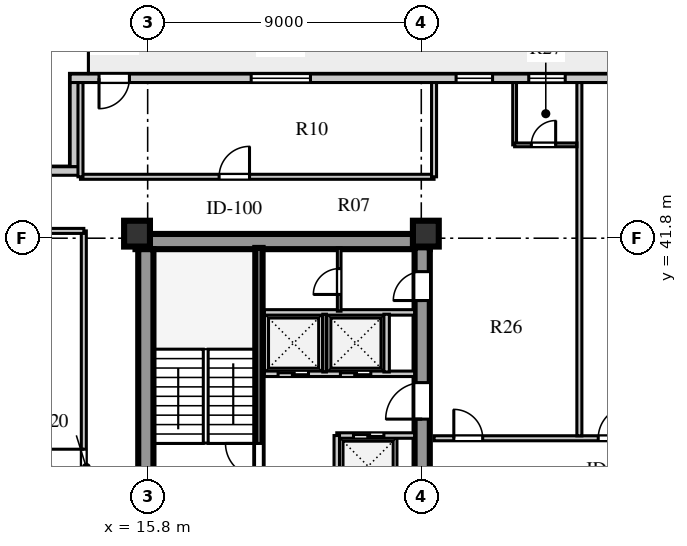
"""IFC4 building model, lengths in metres.
Left out: names, types, materials, properties, quantities, classifications, styles, units other than length and angle.
Written with IfcOpenShell. Run it as: python <this file> out.ifc"""

import sys

from ifc_helpers import new_model, si_unit, direction, frame, frame_2d, origin, origin_2d, place, context, subcontext, project, spatial, rectangle, extrude, element, fill, save


model = new_model("IFC4")
c1 = context("Model", 3, precision=1e-05, world=origin(), true_north=direction((0.0, 1.0)))
c2 = subcontext(c1, "Body", "Model", "MODEL_VIEW")
j1 = project(units=[si_unit("LENGTHUNIT", "METRE"), si_unit("PLANEANGLEUNIT", "RADIAN")], contexts=[c1])
p1 = place(None, origin())
s1 = spatial("IfcSite", under=j1, at=p1, CompositionType="ELEMENT")
p2 = place(p1, origin())
s2 = spatial("IfcBuilding", under=s1, at=p2, CompositionType="ELEMENT")
p3 = place(p2, frame((0.0, 0.0, 142.5)))
s3 = spatial("IfcBuildingStorey", under=s2, at=p3, CompositionType="ELEMENT", Elevation=142.5)
p4 = place(p3, frame((15.4, 41.69, 0.0), z_axis=(0.0, 0.0, 1.0), x_axis=(1.0, 0.0, 0.0)))
e1 = element("IfcWall", 1, at=p4, inside=s3, PredefinedType="SHEAR", context=c2, shape_type="SweptSolid", body=[
    extrude(rectangle(XDim=9.68, YDim=0.5, at=frame_2d((4.84, 0.0))), origin(), (0.0, 0.0, 1.0), 3.6),
])
p5 = place(p3, frame((15.74, 15.81, 0.0), z_axis=(0.0, 0.0, 1.0), x_axis=(0.0, 1.0, 0.0)))
e2 = element("IfcWall", 2, at=p5, inside=s3, PredefinedType="SHEAR", context=c2, shape_type="SweptSolid", body=[
    extrude(rectangle(XDim=25.63, YDim=0.5, at=frame_2d((12.815, 0.0))), origin(), (0.0, 0.0, 1.0), 3.6),
])
p6 = place(p3, frame((24.83, 15.74, 0.0), z_axis=(0.0, 0.0, 1.0), x_axis=(0.0, 1.0, 0.0)))
e3 = element("IfcWall", 3, at=p6, inside=s3, PredefinedType="SHEAR", context=c2, shape_type="SweptSolid", body=[
    extrude(rectangle(XDim=25.76, YDim=0.5, at=frame_2d((12.88, 0.0))), origin(), (0.0, 0.0, 1.0), 3.6),
])
p7 = place(p6, frame((1.61, 0.0, 0.0)))
e4 = element("IfcOpeningElement", 4, at=p7, cuts=e3, PredefinedType="OPENING", context=c2, shape_type="SweptSolid", body=[
    extrude(rectangle(XDim=1.2, YDim=2.1, at=frame_2d((0.6, 1.05))), frame((0.0, 0.26, 0.0), z_axis=(0.0, -1.0, 0.0), x_axis=(1.0, 0.0, 0.0)), (0.0, 0.0, 1.0), 0.52),
])
p8 = place(p6, frame((6.78, 0.0, 0.0)))
e5 = element("IfcOpeningElement", 5, at=p8, cuts=e3, PredefinedType="OPENING", context=c2, shape_type="SweptSolid", body=[
    extrude(rectangle(XDim=0.85, YDim=2.06, at=frame_2d((0.425, 1.03))), frame((0.0, 0.26, 0.0), z_axis=(0.0, -1.0, 0.0), x_axis=(1.0, 0.0, 0.0)), (0.0, 0.0, 1.0), 0.52),
])
p9 = place(p6, frame((12.11, 0.0, 0.0)))
e6 = element("IfcOpeningElement", 6, at=p9, cuts=e3, PredefinedType="OPENING", context=c2, shape_type="SweptSolid", body=[
    extrude(rectangle(XDim=1.5, YDim=2.12, at=frame_2d((0.75, 1.06))), frame((0.0, 0.26, 0.0), z_axis=(0.0, -1.0, 0.0), x_axis=(1.0, 0.0, 0.0)), (0.0, 0.0, 1.0), 0.52),
])
p10 = place(p6, frame((20.11, 0.0, 0.0)))
e7 = element("IfcOpeningElement", 7, at=p10, cuts=e3, PredefinedType="OPENING", context=c2, shape_type="SweptSolid", body=[
    extrude(rectangle(XDim=1.2, YDim=2.12, at=frame_2d((0.6, 1.06))), frame((0.0, 0.26, 0.0), z_axis=(0.0, -1.0, 0.0), x_axis=(1.0, 0.0, 0.0)), (0.0, 0.0, 1.0), 0.52),
])
p11 = place(p6, frame((24.01, 0.0, 0.0)))
e8 = element("IfcOpeningElement", 8, at=p11, cuts=e3, PredefinedType="OPENING", context=c2, shape_type="SweptSolid", body=[
    extrude(rectangle(XDim=0.95, YDim=2.1, at=frame_2d((0.475, 1.05))), frame((0.0, 0.26, 0.0), z_axis=(0.0, -1.0, 0.0), x_axis=(1.0, 0.0, 0.0)), (0.0, 0.0, 1.0), 0.52),
])
for number, where, z_axis, x_axis in (
    (9, (15.45, 41.95, 0.0), (0.0, 0.0, 1.0), (1.0, 0.0, 0.0)),
    (10, (24.95, 41.95, 0.0), (0.0, 0.0, 1.0), (1.0, 0.0, 0.0)),
):
    element("IfcColumn", number, at=place(p3, frame(where, z_axis=z_axis, x_axis=x_axis)), inside=s3, PredefinedType="COLUMN", context=c2, shape_type="SweptSolid", body=[
        extrude(rectangle(XDim=0.85, YDim=0.85, at=origin_2d()), origin(), (0.0, 0.0, 1.0), 3.6),
    ])
p12 = place(p3, frame((45.35, 47.06, 0.0), z_axis=(0.0, 0.0, 1.0), x_axis=(-1.0, 0.0, 0.0)))
e11 = element("IfcWall", 11, at=p12, inside=s3, PredefinedType="STANDARD", context=c2, shape_type="SweptSolid", body=[
    extrude(rectangle(XDim=32.1, YDim=0.28, at=frame_2d((16.05, 0.0))), origin(), (0.0, 0.0, 1.0), 3.6),
])
p13 = place(p12, frame((30.15, 0.0, 0.0)))
e12 = element("IfcOpeningElement", 12, at=p13, cuts=e11, PredefinedType="OPENING", context=c2, shape_type="SweptSolid", body=[
    extrude(rectangle(XDim=1.0, YDim=2.05, at=frame_2d((0.5, 1.025))), frame((0.0, 0.15, 0.0), z_axis=(0.0, -1.0, 0.0), x_axis=(1.0, 0.0, 0.0)), (0.0, 0.0, 1.0), 0.3),
])
p14 = place(p12, frame((24.195, 0.0, 0.8)))
e13 = element("IfcOpeningElement", 13, at=p14, cuts=e11, PredefinedType="OPENING", context=c2, shape_type="SweptSolid", body=[
    extrude(rectangle(XDim=1.95, YDim=2.0, at=frame_2d((0.975, 1.0))), frame((0.0, 0.15, 0.0), z_axis=(0.0, -1.0, 0.0), x_axis=(1.0, 0.0, 0.0)), (0.0, 0.0, 1.0), 0.3),
])
p15 = place(p12, frame((18.205, 0.0, 0.8)))
e14 = element("IfcOpeningElement", 14, at=p15, cuts=e11, PredefinedType="OPENING", context=c2, shape_type="SweptSolid", body=[
    extrude(rectangle(XDim=1.2, YDim=1.75, at=frame_2d((0.6, 0.875))), frame((0.0, 0.15, 0.0), z_axis=(0.0, -1.0, 0.0), x_axis=(1.0, 0.0, 0.0)), (0.0, 0.0, 1.0), 0.3),
])
p16 = place(p12, frame((15.815, 0.0, 0.8)))
e15 = element("IfcOpeningElement", 15, at=p16, cuts=e11, PredefinedType="OPENING", context=c2, shape_type="SweptSolid", body=[
    extrude(rectangle(XDim=1.2, YDim=1.75, at=frame_2d((0.6, 0.875))), frame((0.0, 0.15, 0.0), z_axis=(0.0, -1.0, 0.0), x_axis=(1.0, 0.0, 0.0)), (0.0, 0.0, 1.0), 0.3),
])
p17 = place(p12, frame((12.24, 0.0, 0.8)))
e16 = element("IfcOpeningElement", 16, at=p17, cuts=e11, PredefinedType="OPENING", context=c2, shape_type="SweptSolid", body=[
    extrude(rectangle(XDim=1.5, YDim=2.0, at=frame_2d((0.75, 1.0))), frame((0.0, 0.15, 0.0), z_axis=(0.0, -1.0, 0.0), x_axis=(1.0, 0.0, 0.0)), (0.0, 0.0, 1.0), 0.3),
])
p18 = place(p12, frame((6.98, 0.0, 0.8)))
e17 = element("IfcOpeningElement", 17, at=p18, cuts=e11, PredefinedType="OPENING", context=c2, shape_type="SweptSolid", body=[
    extrude(rectangle(XDim=1.2, YDim=1.75, at=frame_2d((0.6, 0.875))), frame((0.0, 0.15, 0.0), z_axis=(0.0, -1.0, 0.0), x_axis=(1.0, 0.0, 0.0)), (0.0, 0.0, 1.0), 0.3),
])
p19 = place(p12, frame((1.12, 0.0, 0.8)))
e18 = element("IfcOpeningElement", 18, at=p19, cuts=e11, PredefinedType="OPENING", context=c2, shape_type="SweptSolid", body=[
    extrude(rectangle(XDim=2.4, YDim=2.05, at=frame_2d((1.2, 1.025))), frame((0.0, 0.15, 0.0), z_axis=(0.0, -1.0, 0.0), x_axis=(1.0, 0.0, 0.0)), (0.0, 0.0, 1.0), 0.3),
])
p20 = place(p3, frame((13.39, 46.92, 0.0), z_axis=(0.0, 0.0, 1.0), x_axis=(0.0, -1.0, 0.0)))
e19 = element("IfcWall", 19, at=p20, inside=s3, PredefinedType="STANDARD", context=c2, shape_type="SweptSolid", body=[
    extrude(rectangle(XDim=2.77, YDim=0.28, at=frame_2d((1.385, 0.0))), origin(), (0.0, 0.0, 1.0), 3.6),
])
p21 = place(p3, frame((13.53, 44.01, 0.0), z_axis=(0.0, 0.0, 1.0), x_axis=(-1.0, 0.0, 0.0)))
e20 = element("IfcWall", 20, at=p21, inside=s3, PredefinedType="STANDARD", context=c2, shape_type="SweptSolid", body=[
    extrude(rectangle(XDim=3.33, YDim=0.28, at=frame_2d((1.665, 0.0))), origin(), (0.0, 0.0, 1.0), 3.6),
])
p22 = place(p3, frame((19.46, 33.3, 0.0), z_axis=(0.0, 0.0, 1.0), x_axis=(0.0, 1.0, 0.0)))
e21 = element("IfcWall", 21, at=p22, inside=s3, PredefinedType="SHEAR", context=c2, shape_type="SweptSolid", body=[
    extrude(rectangle(XDim=8.18, YDim=0.24, at=frame_2d((4.09, 0.0))), origin(), (0.0, 0.0, 1.0), 3.85),
])
p23 = place(p22, frame((0.65, 0.0, 0.0)))
e22 = element("IfcOpeningElement", 22, at=p23, cuts=e21, PredefinedType="OPENING", context=c2, shape_type="SweptSolid", body=[
    extrude(rectangle(XDim=1.1, YDim=2.1, at=frame_2d((0.55, 1.05))), frame((0.0, 0.13, 0.0), z_axis=(0.0, -1.0, 0.0), x_axis=(1.0, 0.0, 0.0)), (0.0, 0.0, 1.0), 0.26),
])
p24 = place(p3, frame((22.02, 35.31, 0.0), z_axis=(0.0, 0.0, 1.0), x_axis=(1.0, 0.0, 0.0)))
e23 = element("IfcWall", 23, at=p24, inside=s3, PredefinedType="SOLIDWALL", context=c2, shape_type="SweptSolid", body=[
    extrude(rectangle(XDim=2.56, YDim=0.18, at=frame_2d((1.28, 0.0))), origin(), (0.0, 0.0, 1.0), 3.6),
])
p25 = place(p24, frame((0.55, 0.0, 0.0)))
e24 = element("IfcOpeningElement", 24, at=p25, cuts=e23, PredefinedType="OPENING", context=c2, shape_type="SweptSolid", body=[
    extrude(rectangle(XDim=1.0, YDim=2.1, at=frame_2d((0.5, 1.05))), frame((0.0, 0.1, 0.0), z_axis=(0.0, -1.0, 0.0), x_axis=(1.0, 0.0, 0.0)), (0.0, 0.0, 1.0), 0.2),
])
p26 = place(p3, frame((22.02, 33.3, 0.0), z_axis=(0.0, 0.0, 1.0), x_axis=(0.0, 1.0, 0.0)))
e25 = element("IfcWall", 25, at=p26, inside=s3, PredefinedType="SOLIDWALL", context=c2, shape_type="SweptSolid", body=[
    extrude(rectangle(XDim=2.01, YDim=0.18, at=frame_2d((1.005, 0.0))), origin(), (0.0, 0.0, 1.0), 3.6),
])
p27 = place(p3, frame((19.64, 37.34, 0.0), z_axis=(0.0, 0.0, 1.0), x_axis=(1.0, 0.0, 0.0)))
e26 = element("IfcWall", 26, at=p27, inside=s3, PredefinedType="SOLIDWALL", context=c2, shape_type="SweptSolid", body=[
    extrude(rectangle(XDim=4.94, YDim=0.18, at=frame_2d((2.47, 0.0))), origin(), (0.0, 0.0, 1.0), 3.6),
])
p28 = place(p27, frame((0.45, 0.0, 0.0)))
e27 = element("IfcOpeningElement", 27, at=p28, cuts=e26, PredefinedType="OPENING", context=c2, shape_type="SweptSolid", body=[
    extrude(rectangle(XDim=1.0, YDim=2.1, at=frame_2d((0.5, 1.05))), frame((0.0, 0.1, 0.0), z_axis=(0.0, -1.0, 0.0), x_axis=(1.0, 0.0, 0.0)), (0.0, 0.0, 1.0), 0.2),
])
p29 = place(p27, frame((2.5, 0.0, 0.0)))
e28 = element("IfcOpeningElement", 28, at=p29, cuts=e26, PredefinedType="OPENING", context=c2, shape_type="SweptSolid", body=[
    extrude(rectangle(XDim=1.0, YDim=2.1, at=frame_2d((0.5, 1.05))), frame((0.0, 0.1, 0.0), z_axis=(0.0, -1.0, 0.0), x_axis=(1.0, 0.0, 0.0)), (0.0, 0.0, 1.0), 0.2),
])
p30 = place(p3, frame((19.64, 39.36, 0.0), z_axis=(0.0, 0.0, 1.0), x_axis=(1.0, 0.0, 0.0)))
e29 = element("IfcWall", 29, at=p30, inside=s3, PredefinedType="SOLIDWALL", context=c2, shape_type="SweptSolid", body=[
    extrude(rectangle(XDim=4.94, YDim=0.18, at=frame_2d((2.47, 0.0))), origin(), (0.0, 0.0, 1.0), 3.6),
])
p31 = place(p3, frame((21.62, 37.4, 0.0), z_axis=(0.0, 0.0, 1.0), x_axis=(0.0, 1.0, 0.0)))
e30 = element("IfcWall", 30, at=p31, inside=s3, PredefinedType="PARTITIONING", context=c2, shape_type="SweptSolid", body=[
    extrude(rectangle(XDim=1.9, YDim=0.12, at=frame_2d((0.95, 0.0))), origin(), (0.0, 0.0, 1.0), 3.6),
])
p32 = place(p3, frame((23.66, 37.4, 0.0), z_axis=(0.0, 0.0, 1.0), x_axis=(0.0, 1.0, 0.0)))
e31 = element("IfcWall", 31, at=p32, inside=s3, PredefinedType="SOLIDWALL", context=c2, shape_type="SweptSolid", body=[
    extrude(rectangle(XDim=1.9, YDim=0.18, at=frame_2d((0.95, 0.0))), origin(), (0.0, 0.0, 1.0), 3.6),
])
p33 = place(p3, frame((22.1, 39.4, 0.0), z_axis=(0.0, 0.0, 1.0), x_axis=(0.0, 1.0, 0.0)))
e32 = element("IfcWall", 32, at=p33, inside=s3, PredefinedType="PARTITIONING", context=c2, shape_type="SweptSolid", body=[
    extrude(rectangle(XDim=2.08, YDim=0.12, at=frame_2d((1.04, 0.0))), origin(), (0.0, 0.0, 1.0), 3.6),
])
p34 = place(p33, frame((0.55, 0.0, 0.0)))
e33 = element("IfcOpeningElement", 33, at=p34, cuts=e32, PredefinedType="OPENING", context=c2, shape_type="SweptSolid", body=[
    extrude(rectangle(XDim=0.85, YDim=2.06, at=frame_2d((0.425, 1.03))), frame((0.0, 0.07, 0.0), z_axis=(0.0, -1.0, 0.0), x_axis=(1.0, 0.0, 0.0)), (0.0, 0.0, 1.0), 0.14),
])
p35 = place(p3, frame((25.22, 35.22, 0.0), z_axis=(0.0, 0.0, 1.0), x_axis=(1.0, 0.0, 0.0)))
e34 = element("IfcWall", 34, at=p35, inside=s3, PredefinedType="PARTITIONING", context=c2, shape_type="SweptSolid", body=[
    extrude(rectangle(XDim=9.5, YDim=0.165, at=frame_2d((4.75, 0.0))), origin(), (0.0, 0.0, 1.0), 3.6),
])
p36 = place(p35, frame((0.65, 0.0, 0.0)))
e35 = element("IfcOpeningElement", 35, at=p36, cuts=e34, PredefinedType="OPENING", context=c2, shape_type="SweptSolid", body=[
    extrude(rectangle(XDim=0.95, YDim=2.1, at=frame_2d((0.475, 1.05))), frame((0.0, 0.093, 0.0), z_axis=(0.0, -1.0, 0.0), x_axis=(1.0, 0.0, 0.0)), (0.0, 0.0, 1.0), 0.185),
])
p37 = place(p35, frame((5.4, 0.0, 0.0)))
e36 = element("IfcOpeningElement", 36, at=p37, cuts=e34, PredefinedType="OPENING", context=c2, shape_type="SweptSolid", body=[
    extrude(rectangle(XDim=1.05, YDim=2.1, at=frame_2d((0.525, 1.05))), frame((0.0, 0.093, 0.0), z_axis=(0.0, -1.0, 0.0), x_axis=(1.0, 0.0, 0.0)), (0.0, 0.0, 1.0), 0.185),
])
p38 = place(p3, frame((13.7, 15.16, 0.0), z_axis=(0.0, 0.0, 1.0), x_axis=(0.0, 1.0, 0.0)))
e37 = element("IfcWall", 37, at=p38, inside=s3, PredefinedType="PARTITIONING", context=c2, shape_type="SweptSolid", body=[
    extrude(rectangle(XDim=26.88, YDim=0.165, at=frame_2d((13.44, 0.0))), origin(), (0.0, 0.0, 1.0), 3.6),
])
p39 = place(p38, frame((4.2, 0.0, 0.0)))
e38 = element("IfcOpeningElement", 38, at=p39, cuts=e37, PredefinedType="OPENING", context=c2, shape_type="SweptSolid", body=[
    extrude(rectangle(XDim=1.2, YDim=2.1, at=frame_2d((0.6, 1.05))), frame((0.0, 0.093, 0.0), z_axis=(0.0, -1.0, 0.0), x_axis=(1.0, 0.0, 0.0)), (0.0, 0.0, 1.0), 0.185),
])
p40 = place(p38, frame((18.5, 0.0, 0.0)))
e39 = element("IfcOpeningElement", 39, at=p40, cuts=e37, PredefinedType="OPENING", context=c2, shape_type="SweptSolid", body=[
    extrude(rectangle(XDim=1.2, YDim=2.1, at=frame_2d((0.6, 1.05))), frame((0.0, 0.093, 0.0), z_axis=(0.0, -1.0, 0.0), x_axis=(1.0, 0.0, 0.0)), (0.0, 0.0, 1.0), 0.185),
])
p41 = place(p3, frame((10.48, 42.04, 0.0), z_axis=(0.0, 0.0, 1.0), x_axis=(1.0, 0.0, 0.0)))
e40 = element("IfcWall", 40, at=p41, inside=s3, PredefinedType="PARTITIONING", context=c2, shape_type="SweptSolid", body=[
    extrude(rectangle(XDim=3.22, YDim=0.165, at=frame_2d((1.61, 0.0))), origin(), (0.0, 0.0, 1.0), 3.1),
])
p42 = place(p3, frame((13.59, 43.82, 0.0), z_axis=(0.0, 0.0, 1.0), x_axis=(1.0, 0.0, 0.0)))
e41 = element("IfcWall", 41, at=p42, inside=s3, PredefinedType="PARTITIONING", context=c2, shape_type="SweptSolid", body=[
    extrude(rectangle(XDim=11.63, YDim=0.165, at=frame_2d((5.815, 0.0))), origin(), (0.0, 0.0, 1.0), 3.6),
])
p43 = place(p42, frame((4.56, 0.0, 0.0)))
e42 = element("IfcOpeningElement", 42, at=p43, cuts=e41, PredefinedType="OPENING", context=c2, shape_type="SweptSolid", body=[
    extrude(rectangle(XDim=1.0, YDim=2.08, at=frame_2d((0.5, 1.04))), frame((0.0, 0.093, 0.0), z_axis=(0.0, -1.0, 0.0), x_axis=(1.0, 0.0, 0.0)), (0.0, 0.0, 1.0), 0.185),
])
p44 = place(p3, frame((13.59, 43.82, 0.0), z_axis=(0.0, 0.0, 1.0), x_axis=(0.0, 1.0, 0.0)))
e43 = element("IfcWall", 43, at=p44, inside=s3, PredefinedType="PARTITIONING", context=c2, shape_type="SweptSolid", body=[
    extrude(rectangle(XDim=3.1, YDim=0.165, at=frame_2d((1.55, 0.0))), origin(), (0.0, 0.0, 1.0), 3.6),
])
p45 = place(p3, frame((25.22, 43.82, 0.0), z_axis=(0.0, 0.0, 1.0), x_axis=(0.0, 1.0, 0.0)))
e44 = element("IfcWall", 44, at=p45, inside=s3, PredefinedType="PARTITIONING", context=c2, shape_type="SweptSolid", body=[
    extrude(rectangle(XDim=3.1, YDim=0.165, at=frame_2d((1.55, 0.0))), origin(), (0.0, 0.0, 1.0), 3.1),
])
p46 = place(p3, frame((30.0, 35.3, 0.0), z_axis=(0.0, 0.0, 1.0), x_axis=(0.0, 1.0, 0.0)))
e45 = element("IfcWall", 45, at=p46, inside=s3, PredefinedType="PARTITIONING", context=c2, shape_type="SweptSolid", body=[
    extrude(rectangle(XDim=11.62, YDim=0.165, at=frame_2d((5.81, 0.0))), origin(), (0.0, 0.0, 1.0), 3.6),
])
p47 = place(p3, frame((27.87, 44.87, 0.0), z_axis=(0.0, 0.0, 1.0), x_axis=(0.0, 1.0, 0.0)))
e46 = element("IfcWall", 46, at=p47, inside=s3, PredefinedType="PLUMBINGWALL", context=c2, shape_type="SweptSolid", body=[
    extrude(rectangle(XDim=2.05, YDim=0.125, at=frame_2d((1.025, 0.0))), origin(), (0.0, 0.0, 1.0), 3.6),
])
p48 = place(p3, frame((27.87, 44.87, 0.0), z_axis=(0.0, 0.0, 1.0), x_axis=(1.0, 0.0, 0.0)))
e47 = element("IfcWall", 47, at=p48, inside=s3, PredefinedType="PLUMBINGWALL", context=c2, shape_type="SweptSolid", body=[
    extrude(rectangle(XDim=2.05, YDim=0.125, at=frame_2d((1.025, 0.0))), origin(), (0.0, 0.0, 1.0), 3.6),
])
p49 = place(p48, frame((0.55, 0.0, 0.0)))
e48 = element("IfcOpeningElement", 48, at=p49, cuts=e47, PredefinedType="OPENING", context=c2, shape_type="SweptSolid", body=[
    extrude(rectangle(XDim=0.8, YDim=2.05, at=frame_2d((0.4, 1.025))), frame((0.0, 0.073, 0.0), z_axis=(0.0, -1.0, 0.0), x_axis=(1.0, 0.0, 0.0)), (0.0, 0.0, 1.0), 0.145),
])
p50 = place(p13, frame((1.0, 0.0, 0.0), z_axis=(0.0, 0.0, 1.0), x_axis=(-1.0, 0.0, 0.0)))
e49 = element("IfcDoor", 49, at=p50, inside=s3, OperationType="SINGLE_SWING_LEFT", PredefinedType="DOOR", context=c2, shape_type="SweptSolid", body=[
    extrude(rectangle(XDim=1.0, YDim=2.05, at=frame_2d((0.5, 1.025))), frame((0.0, 0.025, 0.0), z_axis=(0.0, -1.0, 0.0), x_axis=(1.0, 0.0, 0.0)), (0.0, 0.0, 1.0), 0.05),
])
fill(e12, e49)
p51 = place(p14, origin())
e50 = element("IfcWindow", 50, at=p51, inside=s3, PartitioningType="SINGLE_PANEL", PredefinedType="WINDOW", context=c2, shape_type="SweptSolid", body=[
    extrude(rectangle(XDim=1.95, YDim=2.0, at=frame_2d((0.975, 1.0))), frame((0.0, 0.03, 0.0), z_axis=(0.0, -1.0, 0.0), x_axis=(1.0, 0.0, 0.0)), (0.0, 0.0, 1.0), 0.06),
])
fill(e13, e50)
p52 = place(p15, origin())
e51 = element("IfcWindow", 51, at=p52, inside=s3, PartitioningType="SINGLE_PANEL", PredefinedType="WINDOW", context=c2, shape_type="SweptSolid", body=[
    extrude(rectangle(XDim=1.2, YDim=1.75, at=frame_2d((0.6, 0.875))), frame((0.0, 0.03, 0.0), z_axis=(0.0, -1.0, 0.0), x_axis=(1.0, 0.0, 0.0)), (0.0, 0.0, 1.0), 0.06),
])
fill(e14, e51)
p53 = place(p16, origin())
e52 = element("IfcWindow", 52, at=p53, inside=s3, PartitioningType="SINGLE_PANEL", PredefinedType="WINDOW", context=c2, shape_type="SweptSolid", body=[
    extrude(rectangle(XDim=1.2, YDim=1.75, at=frame_2d((0.6, 0.875))), frame((0.0, 0.03, 0.0), z_axis=(0.0, -1.0, 0.0), x_axis=(1.0, 0.0, 0.0)), (0.0, 0.0, 1.0), 0.06),
])
fill(e15, e52)
p54 = place(p23, origin())
e53 = element("IfcDoor", 53, at=p54, inside=s3, OperationType="SINGLE_SWING_RIGHT", PredefinedType="DOOR", context=c2, shape_type="SweptSolid", body=[
    extrude(rectangle(XDim=1.1, YDim=2.1, at=frame_2d((0.55, 1.05))), frame((0.0, 0.025, 0.0), z_axis=(0.0, -1.0, 0.0), x_axis=(1.0, 0.0, 0.0)), (0.0, 0.0, 1.0), 0.05),
])
fill(e22, e53)
p55 = place(p10, frame((1.2, 0.0, 0.0), z_axis=(0.0, 0.0, 1.0), x_axis=(-1.0, 0.0, 0.0)))
e54 = element("IfcDoor", 54, at=p55, inside=s3, OperationType="SINGLE_SWING_RIGHT", PredefinedType="DOOR", context=c2, shape_type="SweptSolid", body=[
    extrude(rectangle(XDim=1.2, YDim=2.12, at=frame_2d((0.6, 1.06))), frame((0.0, 0.025, 0.0), z_axis=(0.0, -1.0, 0.0), x_axis=(1.0, 0.0, 0.0)), (0.0, 0.0, 1.0), 0.05),
])
fill(e7, e54)
p56 = place(p28, frame((1.0, 0.0, 0.0), z_axis=(0.0, 0.0, 1.0), x_axis=(-1.0, 0.0, 0.0)))
e55 = element("IfcDoor", 55, at=p56, inside=s3, OperationType="DOUBLE_DOOR_SLIDING", PredefinedType="DOOR", context=c2, shape_type="SweptSolid", body=[
    extrude(rectangle(XDim=1.0, YDim=2.1, at=frame_2d((0.5, 1.05))), frame((0.0, 0.025, 0.0), z_axis=(0.0, -1.0, 0.0), x_axis=(1.0, 0.0, 0.0)), (0.0, 0.0, 1.0), 0.05),
])
fill(e27, e55)
p57 = place(p29, frame((1.0, 0.0, 0.0), z_axis=(0.0, 0.0, 1.0), x_axis=(-1.0, 0.0, 0.0)))
e56 = element("IfcDoor", 56, at=p57, inside=s3, OperationType="DOUBLE_DOOR_SLIDING", PredefinedType="DOOR", context=c2, shape_type="SweptSolid", body=[
    extrude(rectangle(XDim=1.0, YDim=2.1, at=frame_2d((0.5, 1.05))), frame((0.0, 0.025, 0.0), z_axis=(0.0, -1.0, 0.0), x_axis=(1.0, 0.0, 0.0)), (0.0, 0.0, 1.0), 0.05),
])
fill(e28, e56)
p58 = place(p25, origin())
e57 = element("IfcDoor", 57, at=p58, inside=s3, OperationType="DOUBLE_DOOR_SLIDING", PredefinedType="DOOR", context=c2, shape_type="SweptSolid", body=[
    extrude(rectangle(XDim=1.0, YDim=2.1, at=frame_2d((0.5, 1.05))), frame((0.0, 0.025, 0.0), z_axis=(0.0, -1.0, 0.0), x_axis=(1.0, 0.0, 0.0)), (0.0, 0.0, 1.0), 0.05),
])
fill(e24, e57)
p59 = place(p34, origin())
e58 = element("IfcDoor", 58, at=p59, inside=s3, OperationType="SINGLE_SWING_LEFT", PredefinedType="DOOR", context=c2, shape_type="SweptSolid", body=[
    extrude(rectangle(XDim=0.85, YDim=2.06, at=frame_2d((0.425, 1.03))), frame((0.0, 0.025, 0.0), z_axis=(0.0, -1.0, 0.0), x_axis=(1.0, 0.0, 0.0)), (0.0, 0.0, 1.0), 0.05),
])
fill(e33, e58)
p60 = place(p11, frame((0.95, 0.0, 0.0), z_axis=(0.0, 0.0, 1.0), x_axis=(-1.0, 0.0, 0.0)))
e59 = element("IfcDoor", 59, at=p60, inside=s3, OperationType="SINGLE_SWING_RIGHT", PredefinedType="DOOR", context=c2, shape_type="SweptSolid", body=[
    extrude(rectangle(XDim=0.95, YDim=2.1, at=frame_2d((0.475, 1.05))), frame((0.0, 0.025, 0.0), z_axis=(0.0, -1.0, 0.0), x_axis=(1.0, 0.0, 0.0)), (0.0, 0.0, 1.0), 0.05),
])
fill(e8, e59)
p61 = place(p43, origin())
e60 = element("IfcDoor", 60, at=p61, inside=s3, OperationType="SINGLE_SWING_RIGHT", PredefinedType="DOOR", context=c2, shape_type="SweptSolid", body=[
    extrude(rectangle(XDim=1.0, YDim=2.08, at=frame_2d((0.5, 1.04))), frame((0.0, 0.025, 0.0), z_axis=(0.0, -1.0, 0.0), x_axis=(1.0, 0.0, 0.0)), (0.0, 0.0, 1.0), 0.05),
])
fill(e42, e60)
p62 = place(p40, origin())
e61 = element("IfcDoor", 61, at=p62, inside=s3, OperationType="SINGLE_SWING_RIGHT", PredefinedType="DOOR", context=c2, shape_type="SweptSolid", body=[
    extrude(rectangle(XDim=1.2, YDim=2.1, at=frame_2d((0.6, 1.05))), frame((0.0, 0.025, 0.0), z_axis=(0.0, -1.0, 0.0), x_axis=(1.0, 0.0, 0.0)), (0.0, 0.0, 1.0), 0.05),
])
fill(e39, e61)
p63 = place(p36, origin())
e62 = element("IfcDoor", 62, at=p63, inside=s3, OperationType="SINGLE_SWING_LEFT", PredefinedType="DOOR", context=c2, shape_type="SweptSolid", body=[
    extrude(rectangle(XDim=0.95, YDim=2.1, at=frame_2d((0.475, 1.05))), frame((0.0, 0.025, 0.0), z_axis=(0.0, -1.0, 0.0), x_axis=(1.0, 0.0, 0.0)), (0.0, 0.0, 1.0), 0.05),
])
fill(e35, e62)
p64 = place(p49, frame((0.8, 0.0, 0.0), z_axis=(0.0, 0.0, 1.0), x_axis=(-1.0, 0.0, 0.0)))
e63 = element("IfcDoor", 63, at=p64, inside=s3, OperationType="SINGLE_SWING_LEFT", PredefinedType="DOOR", context=c2, shape_type="SweptSolid", body=[
    extrude(rectangle(XDim=0.8, YDim=2.05, at=frame_2d((0.4, 1.025))), frame((0.0, 0.025, 0.0), z_axis=(0.0, -1.0, 0.0), x_axis=(1.0, 0.0, 0.0)), (0.0, 0.0, 1.0), 0.05),
])
fill(e48, e63)
p65 = place(p37, origin())
e64 = element("IfcDoor", 64, at=p65, inside=s3, OperationType="SINGLE_SWING_RIGHT", PredefinedType="DOOR", context=c2, shape_type="SweptSolid", body=[
    extrude(rectangle(XDim=1.05, YDim=2.1, at=frame_2d((0.525, 1.05))), frame((0.0, 0.025, 0.0), z_axis=(0.0, -1.0, 0.0), x_axis=(1.0, 0.0, 0.0)), (0.0, 0.0, 1.0), 0.05),
])
fill(e36, e64)
save(model, sys.argv[1])
